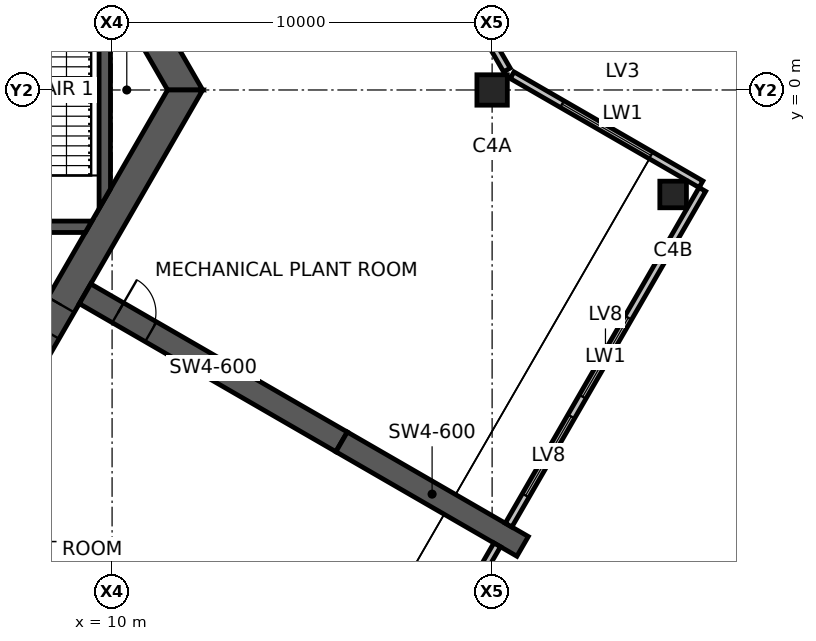
"""IFC4 building model, lengths in metres.
Left out: names, types, materials, properties, quantities, classifications, styles, units other than length and angle.
Written with IfcOpenShell. Run it as: python <this file> out.ifc"""

import sys

from ifc_helpers import new_model, si_unit, direction, frame, frame_2d, origin, origin_2d, place, context, subcontext, project, spatial, polyline, rectangle, hollow_rectangle, outline, extrude, element, fill, save


model = new_model("IFC4")
c1 = context("Model", 3, precision=1e-05, world=origin(), true_north=direction((0.0, 1.0)))
c2 = subcontext(c1, "Body", "Model", "MODEL_VIEW")
j1 = project(units=[si_unit("LENGTHUNIT", "METRE"), si_unit("PLANEANGLEUNIT", "RADIAN")], contexts=[c1])
p1 = place(None, origin())
s1 = spatial("IfcSite", under=j1, at=p1, CompositionType="ELEMENT")
p2 = place(p1, origin())
s2 = spatial("IfcBuilding", under=s1, at=p2, CompositionType="ELEMENT")
p3 = place(p2, frame((0.0, 0.0, 302.5)))
s3 = spatial("IfcBuildingStorey", under=s2, at=p3, CompositionType="ELEMENT", Elevation=302.5)
p4 = place(p3, frame((20.0, 0.0, 0.0), z_axis=(0.0, 0.0, 1.0), x_axis=(1.0, 0.0, 0.0)))
e1 = element("IfcColumn", 1, at=p4, inside=s3, PredefinedType="COLUMN", context=c2, shape_type="SweptSolid", body=[
    extrude(hollow_rectangle(XDim=0.8, YDim=0.8, WallThickness=0.04, at=origin_2d()), origin(), (0.0, 0.0, 1.0), 5.0),
])
p5 = place(p3, frame((24.763, -2.75, 0.0), z_axis=(0.0, 0.0, 1.0), x_axis=(1.0, 0.0, 0.0)))
e2 = element("IfcColumn", 2, at=p5, inside=s3, PredefinedType="COLUMN", context=c2, shape_type="SweptSolid", body=[
    extrude(hollow_rectangle(XDim=0.7, YDim=0.7, WallThickness=0.032, at=origin_2d()), origin(), (0.0, 0.0, 1.0), 5.0),
])
p6 = place(p3, frame((11.922, 0.0, 0.0), z_axis=(0.0, 0.0, 1.0), x_axis=(-0.500004296715, 0.866022923061, 0.0)))
e3 = element("IfcWall", 3, at=p6, inside=s3, PredefinedType="SHEAR", context=c2, shape_type="SweptSolid", body=[
    extrude(outline(polyline([(-0.231, -0.4), (5.835, -0.4), (6.635, -0.4), (12.153, -0.4), (11.691, 0.4), (6.635, 0.4), (5.835, 0.4), (0.231, 0.4), (-0.231, -0.4)])), origin(), (0.0, 0.0, 1.0), 5.0),
])
p7 = place(p6, frame((5.835, 0.0, 0.0)))
e4 = element("IfcOpeningElement", 4, at=p7, cuts=e3, PredefinedType="OPENING", context=c2, shape_type="SweptSolid", body=[
    extrude(rectangle(XDim=0.8, YDim=2.1, at=frame_2d((0.4, 1.05))), frame((0.0, 0.41, 0.0), z_axis=(0.0, -1.0, 0.0), x_axis=(1.0, 0.0, 0.0)), (0.0, 0.0, 1.0), 0.82),
])
p8 = place(p3, frame((5.961, -10.325, 0.0), z_axis=(0.0, 0.0, 1.0), x_axis=(0.500004296715, 0.866022923061, 0.0)))
e5 = element("IfcWall", 5, at=p8, inside=s3, PredefinedType="SHEAR", context=c2, shape_type="SweptSolid", body=[
    extrude(outline(polyline([(-0.231, -0.4), (4.594, -0.4), (5.394, -0.4), (12.153, -0.4), (11.691, 0.4), (5.394, 0.4), (4.594, 0.4), (0.231, 0.4), (-0.231, -0.4)])), origin(), (0.0, 0.0, 1.0), 5.0),
])
p9 = place(p8, frame((4.594, 0.0, 0.0)))
e6 = element("IfcOpeningElement", 6, at=p9, cuts=e5, PredefinedType="OPENING", context=c2, shape_type="SweptSolid", body=[
    extrude(rectangle(XDim=0.8, YDim=2.1, at=frame_2d((0.4, 1.05))), frame((0.0, 0.41, 0.0), z_axis=(0.0, -1.0, 0.0), x_axis=(1.0, 0.0, 0.0)), (0.0, 0.0, 1.0), 0.82),
])
p10 = place(p3, frame((9.288, -5.363, 0.0), z_axis=(0.0, 0.0, 1.0), x_axis=(0.866031736626, -0.499989031036, 0.0)))
e7 = element("IfcWall", 7, at=p10, inside=s3, PredefinedType="SHEAR", context=c2, shape_type="SweptSolid", body=[
    extrude(rectangle(XDim=7.796, YDim=0.6, at=frame_2d((3.898, 0.0))), origin(), (0.0, 0.0, 1.0), 5.0),
])
p11 = place(p10, frame((1.0, 0.0, 0.0)))
e8 = element("IfcOpeningElement", 8, at=p11, cuts=e7, PredefinedType="OPENING", context=c2, shape_type="SweptSolid", body=[
    extrude(rectangle(XDim=1.0, YDim=2.1, at=frame_2d((0.5, 1.05))), frame((0.0, 0.31, 0.0), z_axis=(0.0, -1.0, 0.0), x_axis=(1.0, 0.0, 0.0)), (0.0, 0.0, 1.0), 0.62),
])
p12 = place(p3, frame((16.039, -9.26, 0.0), z_axis=(0.0, 0.0, 1.0), x_axis=(0.866027397988, -0.499996545922, 0.0)))
e9 = element("IfcWall", 9, at=p12, inside=s3, PredefinedType="SHEAR", context=c2, shape_type="SweptSolid", body=[
    extrude(rectangle(XDim=5.5, YDim=0.6, at=frame_2d((2.75, 0.0))), origin(), (0.0, 0.0, 1.0), 5.0),
])
p13 = place(p3, frame((20.389, 0.526, 0.0), z_axis=(0.0, 0.0, 1.0), x_axis=(-0.499993861681, 0.866028947716, 0.0)))
e10 = element("IfcWall", 10, at=p13, inside=s3, PredefinedType="ELEMENTEDWALL", context=c2, shape_type="SweptSolid", body=[
    extrude(rectangle(XDim=19.986, YDim=0.2, at=frame_2d((9.993, 0.0))), origin(), (0.0, 0.0, 1.0), 5.0),
])
p14 = place(p13, frame((0.9, 0.0, 0.4)))
e11 = element("IfcOpeningElement", 11, at=p14, cuts=e10, PredefinedType="OPENING", context=c2, shape_type="SweptSolid", body=[
    extrude(rectangle(XDim=2.531, YDim=4.2, at=frame_2d((1.266, 2.1))), frame((0.0, 0.11, 0.0), z_axis=(0.0, -1.0, 0.0), x_axis=(1.0, 0.0, 0.0)), (0.0, 0.0, 1.0), 0.22),
])
p15 = place(p13, frame((4.031, 0.0, 0.4)))
e12 = element("IfcOpeningElement", 12, at=p15, cuts=e10, PredefinedType="OPENING", context=c2, shape_type="SweptSolid", body=[
    extrude(rectangle(XDim=2.531, YDim=4.2, at=frame_2d((1.266, 2.1))), frame((0.0, 0.11, 0.0), z_axis=(0.0, -1.0, 0.0), x_axis=(1.0, 0.0, 0.0)), (0.0, 0.0, 1.0), 0.22),
])
p16 = place(p13, frame((13.424, 0.0, 0.4)))
e13 = element("IfcOpeningElement", 13, at=p16, cuts=e10, PredefinedType="OPENING", context=c2, shape_type="SweptSolid", body=[
    extrude(rectangle(XDim=2.531, YDim=4.2, at=frame_2d((1.266, 2.1))), frame((0.0, 0.11, 0.0), z_axis=(0.0, -1.0, 0.0), x_axis=(1.0, 0.0, 0.0)), (0.0, 0.0, 1.0), 0.22),
])
p17 = place(p13, frame((16.555, 0.0, 0.4)))
e14 = element("IfcOpeningElement", 14, at=p17, cuts=e10, PredefinedType="OPENING", context=c2, shape_type="SweptSolid", body=[
    extrude(rectangle(XDim=2.531, YDim=4.2, at=frame_2d((1.266, 2.1))), frame((0.0, 0.11, 0.0), z_axis=(0.0, -1.0, 0.0), x_axis=(1.0, 0.0, 0.0)), (0.0, 0.0, 1.0), 0.22),
])
p18 = place(p3, frame((15.033, -20.803, 0.0), z_axis=(0.0, 0.0, 1.0), x_axis=(0.500005610874, 0.86602216432, 0.0)))
e15 = element("IfcWall", 15, at=p18, inside=s3, PredefinedType="ELEMENTEDWALL", context=c2, shape_type="SweptSolid", body=[
    extrude(rectangle(XDim=10.2, YDim=0.2, at=frame_2d((5.1, 0.0))), origin(), (0.0, 0.0, 1.0), 5.0),
])
p19 = place(p18, frame((3.9, 0.0, 0.4)))
e16 = element("IfcOpeningElement", 16, at=p19, cuts=e15, PredefinedType="OPENING", context=c2, shape_type="SweptSolid", body=[
    extrude(rectangle(XDim=2.4, YDim=4.2, at=frame_2d((1.2, 2.1))), frame((0.0, 0.11, 0.0), z_axis=(0.0, -1.0, 0.0), x_axis=(1.0, 0.0, 0.0)), (0.0, 0.0, 1.0), 0.22),
])
p20 = place(p18, frame((6.9, 0.0, 0.4)))
e17 = element("IfcOpeningElement", 17, at=p20, cuts=e15, PredefinedType="OPENING", context=c2, shape_type="SweptSolid", body=[
    extrude(rectangle(XDim=2.4, YDim=4.2, at=frame_2d((1.2, 2.1))), frame((0.0, 0.11, 0.0), z_axis=(0.0, -1.0, 0.0), x_axis=(1.0, 0.0, 0.0)), (0.0, 0.0, 1.0), 0.22),
])
p21 = place(p3, frame((20.433, -11.45, 0.0), z_axis=(0.0, 0.0, 1.0), x_axis=(0.499987659312, 0.866032528567, 0.0)))
e18 = element("IfcWall", 18, at=p21, inside=s3, PredefinedType="ELEMENTEDWALL", context=c2, shape_type="SweptSolid", body=[
    extrude(rectangle(XDim=10.2, YDim=0.2, at=frame_2d((5.1, 0.0))), origin(), (0.0, 0.0, 1.0), 5.0),
])
p22 = place(p21, frame((0.9, 0.0, 0.4)))
e19 = element("IfcOpeningElement", 19, at=p22, cuts=e18, PredefinedType="OPENING", context=c2, shape_type="SweptSolid", body=[
    extrude(rectangle(XDim=2.4, YDim=4.2, at=frame_2d((1.2, 2.1))), frame((0.0, 0.11, 0.0), z_axis=(0.0, -1.0, 0.0), x_axis=(1.0, 0.0, 0.0)), (0.0, 0.0, 1.0), 0.22),
])
p23 = place(p21, frame((3.9, 0.0, 0.4)))
e20 = element("IfcOpeningElement", 20, at=p23, cuts=e18, PredefinedType="OPENING", context=c2, shape_type="SweptSolid", body=[
    extrude(rectangle(XDim=2.4, YDim=4.2, at=frame_2d((1.2, 2.1))), frame((0.0, 0.11, 0.0), z_axis=(0.0, -1.0, 0.0), x_axis=(1.0, 0.0, 0.0)), (0.0, 0.0, 1.0), 0.22),
])
p24 = place(p3, frame((25.496, -2.48, 0.0), z_axis=(0.0, 0.0, 1.0), x_axis=(-0.866019818373, 0.500009674092, 0.0)))
e21 = element("IfcWall", 21, at=p24, inside=s3, PredefinedType="ELEMENTEDWALL", context=c2, shape_type="SweptSolid", body=[
    extrude(rectangle(XDim=5.739, YDim=0.2, at=frame_2d((2.87, 0.0))), origin(), (0.0, 0.0, 1.0), 5.0),
])
p25 = place(p24, frame((1.52, 0.0, 0.4)))
e22 = element("IfcOpeningElement", 22, at=p25, cuts=e21, PredefinedType="OPENING", context=c2, shape_type="SweptSolid", body=[
    extrude(rectangle(XDim=2.7, YDim=4.2, at=frame_2d((1.35, 2.1))), frame((0.0, 0.11, 0.0), z_axis=(0.0, -1.0, 0.0), x_axis=(1.0, 0.0, 0.0)), (0.0, 0.0, 1.0), 0.22),
])
p26 = place(p3, frame((1.45, -3.6, 0.0), z_axis=(0.0, 0.0, 1.0), x_axis=(1.0, 0.0, 0.0)))
e23 = element("IfcWall", 23, at=p26, inside=s3, PredefinedType="SHEAR", context=c2, shape_type="SweptSolid", body=[
    extrude(outline(polyline([(0.0, -0.15), (7.845, -0.15), (8.019, 0.15), (0.0, 0.15), (0.0, -0.15)])), origin(), (0.0, 0.0, 1.0), 5.0),
])
p27 = place(p3, frame((9.808, -2.862, 0.0), z_axis=(0.0, 0.0, 1.0), x_axis=(0.0, 1.0, 0.0)))
e24 = element("IfcWall", 24, at=p27, inside=s3, PredefinedType="SHEAR", context=c2, shape_type="SweptSolid", body=[
    extrude(outline(polyline([(0.26, -0.15), (5.465, -0.15), (5.984, 0.15), (-0.26, 0.15), (0.26, -0.15)])), origin(), (0.0, 0.0, 1.0), 5.0),
])
p28 = place(p3, frame((6.65, -3.6, 5.0), z_axis=(0.0, 0.0, 1.0), x_axis=(1.0, 0.0, 0.0)))
e25 = element("IfcWall", 25, at=p28, inside=s3, PredefinedType="STANDARD", context=c2, shape_type="SweptSolid", body=[
    extrude(rectangle(XDim=3.008, YDim=0.3, at=frame_2d((1.504, 0.0))), origin(), (0.0, 0.0, 1.0), 2.45),
])
p29 = place(p3, frame((9.808, -3.75, 5.0), z_axis=(0.0, 0.0, 1.0), x_axis=(0.0, 1.0, 0.0)))
e26 = element("IfcWall", 26, at=p29, inside=s3, PredefinedType="STANDARD", context=c2, shape_type="SweptSolid", body=[
    extrude(rectangle(XDim=7.5, YDim=0.3, at=frame_2d((3.75, 0.0))), origin(), (0.0, 0.0, 1.0), 2.45),
])
p30 = place(p22, origin())
e27 = element("IfcWindow", 27, at=p30, inside=s3, PartitioningType="SINGLE_PANEL", PredefinedType="USERDEFINED", context=c2, shape_type="SweptSolid", body=[
    extrude(rectangle(XDim=2.4, YDim=4.2, at=frame_2d((1.2, 2.1))), frame((0.0, 0.03, 0.0), z_axis=(0.0, -1.0, 0.0), x_axis=(1.0, 0.0, 0.0)), (0.0, 0.0, 1.0), 0.06),
])
fill(e19, e27)
p31 = place(p23, origin())
e28 = element("IfcWindow", 28, at=p31, inside=s3, PartitioningType="SINGLE_PANEL", PredefinedType="USERDEFINED", context=c2, shape_type="SweptSolid", body=[
    extrude(rectangle(XDim=2.4, YDim=4.2, at=frame_2d((1.2, 2.1))), frame((0.0, 0.03, 0.0), z_axis=(0.0, -1.0, 0.0), x_axis=(1.0, 0.0, 0.0)), (0.0, 0.0, 1.0), 0.06),
])
fill(e20, e28)
p32 = place(p25, origin())
e29 = element("IfcWindow", 29, at=p32, inside=s3, PartitioningType="SINGLE_PANEL", PredefinedType="USERDEFINED", context=c2, shape_type="SweptSolid", body=[
    extrude(rectangle(XDim=2.7, YDim=4.2, at=frame_2d((1.35, 2.1))), frame((0.0, 0.03, 0.0), z_axis=(0.0, -1.0, 0.0), x_axis=(1.0, 0.0, 0.0)), (0.0, 0.0, 1.0), 0.06),
])
fill(e22, e29)
p33 = place(p9, origin())
e30 = element("IfcDoor", 30, at=p33, inside=s3, OperationType="SINGLE_SWING_RIGHT", PredefinedType="DOOR", context=c2, shape_type="SweptSolid", body=[
    extrude(rectangle(XDim=0.8, YDim=2.1, at=frame_2d((0.4, 1.05))), frame((0.0, 0.025, 0.0), z_axis=(0.0, -1.0, 0.0), x_axis=(1.0, 0.0, 0.0)), (0.0, 0.0, 1.0), 0.05),
])
fill(e6, e30)
p34 = place(p11, origin())
e31 = element("IfcDoor", 31, at=p34, inside=s3, OperationType="SINGLE_SWING_LEFT", PredefinedType="DOOR", context=c2, shape_type="SweptSolid", body=[
    extrude(rectangle(XDim=1.0, YDim=2.1, at=frame_2d((0.5, 1.05))), frame((0.0, 0.025, 0.0), z_axis=(0.0, -1.0, 0.0), x_axis=(1.0, 0.0, 0.0)), (0.0, 0.0, 1.0), 0.05),
])
fill(e8, e31)
save(model, sys.argv[1])
